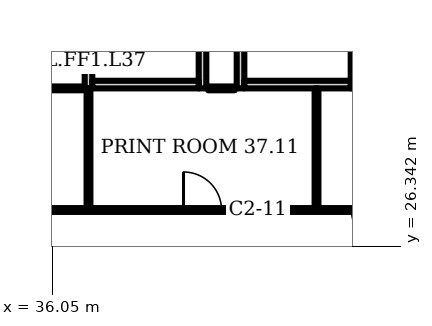
"""IFC4 building model, lengths in metres.
Left out: names, types, materials, properties, quantities, classifications, styles, units other than length and angle.
Written with IfcOpenShell. Run it as: python <this file> out.ifc"""

import sys

from ifc_helpers import new_model, si_unit, direction, frame, frame_2d, origin, place, context, subcontext, project, spatial, rectangle, extrude, element, fill, save


model = new_model("IFC4")
c1 = context("Model", 3, precision=1e-05, world=origin(), true_north=direction((0.0, 1.0)))
c2 = subcontext(c1, "Body", "Model", "MODEL_VIEW")
j1 = project(units=[si_unit("LENGTHUNIT", "METRE"), si_unit("PLANEANGLEUNIT", "RADIAN")], contexts=[c1])
p1 = place(None, origin())
s1 = spatial("IfcSite", under=j1, at=p1, CompositionType="ELEMENT")
p2 = place(p1, origin())
s2 = spatial("IfcBuilding", under=s1, at=p2, CompositionType="ELEMENT")
p3 = place(p2, frame((0.0, 0.0, 155.5)))
s3 = spatial("IfcBuildingStorey", under=s2, at=p3, CompositionType="ELEMENT", Elevation=155.5)
p4 = place(p3, frame((37.0, 30.5, 0.0), z_axis=(0.0, 0.0, 1.0), x_axis=(0.0, 1.0, 0.0)))
e1 = element("IfcWall", 1, at=p4, inside=s3, PredefinedType="PARTITIONING", context=c2, shape_type="SweptSolid", body=[
    extrude(rectangle(XDim=3.5, YDim=0.2, at=frame_2d((1.75, 0.0))), origin(), (0.0, 0.0, 1.0), 3.2),
])
p5 = place(p4, frame((1.2, 0.0, 0.0)))
e2 = element("IfcOpeningElement", 2, at=p5, cuts=e1, PredefinedType="OPENING", context=c2, shape_type="SweptSolid", body=[
    extrude(rectangle(XDim=1.1, YDim=2.1, at=frame_2d((0.55, 1.05))), frame((0.0, 0.11, 0.0), z_axis=(0.0, -1.0, 0.0), x_axis=(1.0, 0.0, 0.0)), (0.0, 0.0, 1.0), 0.22),
])
p6 = place(p3, frame((40.0, 30.5, 0.0), z_axis=(0.0, 0.0, 1.0), x_axis=(0.0, 1.0, 0.0)))
e3 = element("IfcWall", 3, at=p6, inside=s3, PredefinedType="PARTITIONING", context=c2, shape_type="SweptSolid", body=[
    extrude(rectangle(XDim=3.5, YDim=0.2, at=frame_2d((1.75, 0.0))), origin(), (0.0, 0.0, 1.0), 3.2),
])
p7 = place(p3, frame((37.1, 30.6, 0.0), z_axis=(0.0, 0.0, 1.0), x_axis=(1.0, 0.0, 0.0)))
e4 = element("IfcWall", 4, at=p7, inside=s3, PredefinedType="PARTITIONING", context=c2, shape_type="SweptSolid", body=[
    extrude(rectangle(XDim=2.8, YDim=0.2, at=frame_2d((1.4, 0.0))), origin(), (0.0, 0.0, 1.0), 3.2),
])
p8 = place(p3, frame((41.0, 30.5, 0.0), z_axis=(0.0, 0.0, 1.0), x_axis=(0.0, 1.0, 0.0)))
e5 = element("IfcWall", 5, at=p8, inside=s3, PredefinedType="PARTITIONING", context=c2, shape_type="SweptSolid", body=[
    extrude(rectangle(XDim=3.5, YDim=0.2, at=frame_2d((1.75, 0.0))), origin(), (0.0, 0.0, 1.0), 3.2),
])
p9 = place(p3, frame((44.0, 30.5, 0.0), z_axis=(0.0, 0.0, 1.0), x_axis=(0.0, 1.0, 0.0)))
e6 = element("IfcWall", 6, at=p9, inside=s3, PredefinedType="PARTITIONING", context=c2, shape_type="SweptSolid", body=[
    extrude(rectangle(XDim=3.5, YDim=0.2, at=frame_2d((1.75, 0.0))), origin(), (0.0, 0.0, 1.0), 3.2),
])
p10 = place(p9, frame((1.2, 0.0, 0.0)))
e7 = element("IfcOpeningElement", 7, at=p10, cuts=e6, PredefinedType="OPENING", context=c2, shape_type="SweptSolid", body=[
    extrude(rectangle(XDim=1.1, YDim=2.1, at=frame_2d((0.55, 1.05))), frame((0.0, 0.11, 0.0), z_axis=(0.0, -1.0, 0.0), x_axis=(1.0, 0.0, 0.0)), (0.0, 0.0, 1.0), 0.22),
])
p11 = place(p3, frame((41.1, 30.6, 0.0), z_axis=(0.0, 0.0, 1.0), x_axis=(1.0, 0.0, 0.0)))
e8 = element("IfcWall", 8, at=p11, inside=s3, PredefinedType="PARTITIONING", context=c2, shape_type="SweptSolid", body=[
    extrude(rectangle(XDim=2.8, YDim=0.2, at=frame_2d((1.4, 0.0))), origin(), (0.0, 0.0, 1.0), 3.2),
])
p12 = place(p3, frame((16.0, 30.5, 0.0), z_axis=(0.0, 0.0, 1.0), x_axis=(1.0, 0.0, 0.0)))
e9 = element("IfcWall", 9, at=p12, inside=s3, PredefinedType="PARTITIONING", context=c2, shape_type="SweptSolid", body=[
    extrude(rectangle(XDim=20.85, YDim=0.1, at=frame_2d((10.425, 0.0))), origin(), (0.0, 0.0, 1.0), 3.2),
])
p13 = place(p12, frame((14.42, 0.0, 0.0)))
e10 = element("IfcOpeningElement", 10, at=p13, cuts=e9, PredefinedType="OPENING", context=c2, shape_type="SweptSolid", body=[
    extrude(rectangle(XDim=1.0, YDim=2.1, at=frame_2d((0.5, 1.05))), frame((0.0, 0.06, 0.0), z_axis=(0.0, -1.0, 0.0), x_axis=(1.0, 0.0, 0.0)), (0.0, 0.0, 1.0), 0.12),
])
p14 = place(p3, frame((23.2, 27.3, 0.0), z_axis=(0.0, 0.0, 1.0), x_axis=(1.0, 0.0, 0.0)))
e11 = element("IfcWall", 11, at=p14, inside=s3, PredefinedType="PARTITIONING", context=c2, shape_type="SweptSolid", body=[
    extrude(rectangle(XDim=33.9, YDim=0.1, at=frame_2d((16.95, 0.0))), origin(), (0.0, 0.0, 1.0), 3.2),
])
p15 = place(p14, frame((16.3, 0.0, 0.0)))
e12 = element("IfcOpeningElement", 12, at=p15, cuts=e11, PredefinedType="OPENING", context=c2, shape_type="SweptSolid", body=[
    extrude(rectangle(XDim=1.0, YDim=2.1, at=frame_2d((0.5, 1.05))), frame((0.0, 0.06, 0.0), z_axis=(0.0, -1.0, 0.0), x_axis=(1.0, 0.0, 0.0)), (0.0, 0.0, 1.0), 0.12),
])
p16 = place(p14, frame((20.72, 0.0, 0.0)))
e13 = element("IfcOpeningElement", 13, at=p16, cuts=e11, PredefinedType="OPENING", context=c2, shape_type="SweptSolid", body=[
    extrude(rectangle(XDim=1.0, YDim=2.1, at=frame_2d((0.5, 1.05))), frame((0.0, 0.06, 0.0), z_axis=(0.0, -1.0, 0.0), x_axis=(1.0, 0.0, 0.0)), (0.0, 0.0, 1.0), 0.12),
])
p17 = place(p14, frame((23.54, 0.0, 0.0)))
e14 = element("IfcOpeningElement", 14, at=p17, cuts=e11, PredefinedType="OPENING", context=c2, shape_type="SweptSolid", body=[
    extrude(rectangle(XDim=1.0, YDim=2.1, at=frame_2d((0.5, 1.05))), frame((0.0, 0.06, 0.0), z_axis=(0.0, -1.0, 0.0), x_axis=(1.0, 0.0, 0.0)), (0.0, 0.0, 1.0), 0.12),
])
p18 = place(p14, frame((26.36, 0.0, 0.0)))
e15 = element("IfcOpeningElement", 15, at=p18, cuts=e11, PredefinedType="OPENING", context=c2, shape_type="SweptSolid", body=[
    extrude(rectangle(XDim=1.0, YDim=2.1, at=frame_2d((0.5, 1.05))), frame((0.0, 0.06, 0.0), z_axis=(0.0, -1.0, 0.0), x_axis=(1.0, 0.0, 0.0)), (0.0, 0.0, 1.0), 0.12),
])
p19 = place(p14, frame((29.18, 0.0, 0.0)))
e16 = element("IfcOpeningElement", 16, at=p19, cuts=e11, PredefinedType="OPENING", context=c2, shape_type="SweptSolid", body=[
    extrude(rectangle(XDim=1.0, YDim=2.1, at=frame_2d((0.5, 1.05))), frame((0.0, 0.06, 0.0), z_axis=(0.0, -1.0, 0.0), x_axis=(1.0, 0.0, 0.0)), (0.0, 0.0, 1.0), 0.12),
])
p20 = place(p14, frame((32.0, 0.0, 0.0)))
e17 = element("IfcOpeningElement", 17, at=p20, cuts=e11, PredefinedType="OPENING", context=c2, shape_type="SweptSolid", body=[
    extrude(rectangle(XDim=1.0, YDim=2.1, at=frame_2d((0.5, 1.05))), frame((0.0, 0.06, 0.0), z_axis=(0.0, -1.0, 0.0), x_axis=(1.0, 0.0, 0.0)), (0.0, 0.0, 1.0), 0.12),
])
for number, where, z_axis, x_axis in (
    (18, (37.0, 27.3, 0.0), (0.0, 0.0, 1.0), (0.0, 1.0, 0.0)),
    (19, (43.0, 27.3, 0.0), (0.0, 0.0, 1.0), (0.0, 1.0, 0.0)),
):
    element("IfcWall", number, at=place(p3, frame(where, z_axis=z_axis, x_axis=x_axis)), inside=s3, PredefinedType="PARTITIONING", context=c2, shape_type="SweptSolid", body=[
        extrude(rectangle(XDim=3.2, YDim=0.1, at=frame_2d((1.6, 0.0))), origin(), (0.0, 0.0, 1.0), 3.2),
    ])
p21 = place(p3, frame((40.15, 30.5, 0.0), z_axis=(0.0, 0.0, 1.0), x_axis=(1.0, 0.0, 0.0)))
e20 = element("IfcWall", 20, at=p21, inside=s3, PredefinedType="PARTITIONING", context=c2, shape_type="SweptSolid", body=[
    extrude(rectangle(XDim=0.7, YDim=0.1, at=frame_2d((0.35, 0.0))), origin(), (0.0, 0.0, 1.0), 3.2),
])
p22 = place(p15, origin())
e21 = element("IfcDoor", 21, at=p22, inside=s3, OperationType="SINGLE_SWING_LEFT", PredefinedType="DOOR", context=c2, shape_type="SweptSolid", body=[
    extrude(rectangle(XDim=1.0, YDim=2.1, at=frame_2d((0.5, 1.05))), frame((0.0, 0.025, 0.0), z_axis=(0.0, -1.0, 0.0), x_axis=(1.0, 0.0, 0.0)), (0.0, 0.0, 1.0), 0.05),
])
fill(e12, e21)
p23 = place(p16, origin())
e22 = element("IfcDoor", 22, at=p23, inside=s3, OperationType="SINGLE_SWING_RIGHT", PredefinedType="DOOR", context=c2, shape_type="SweptSolid", body=[
    extrude(rectangle(XDim=1.0, YDim=2.1, at=frame_2d((0.5, 1.05))), frame((0.0, 0.025, 0.0), z_axis=(0.0, -1.0, 0.0), x_axis=(1.0, 0.0, 0.0)), (0.0, 0.0, 1.0), 0.05),
])
fill(e13, e22)
save(model, sys.argv[1])
